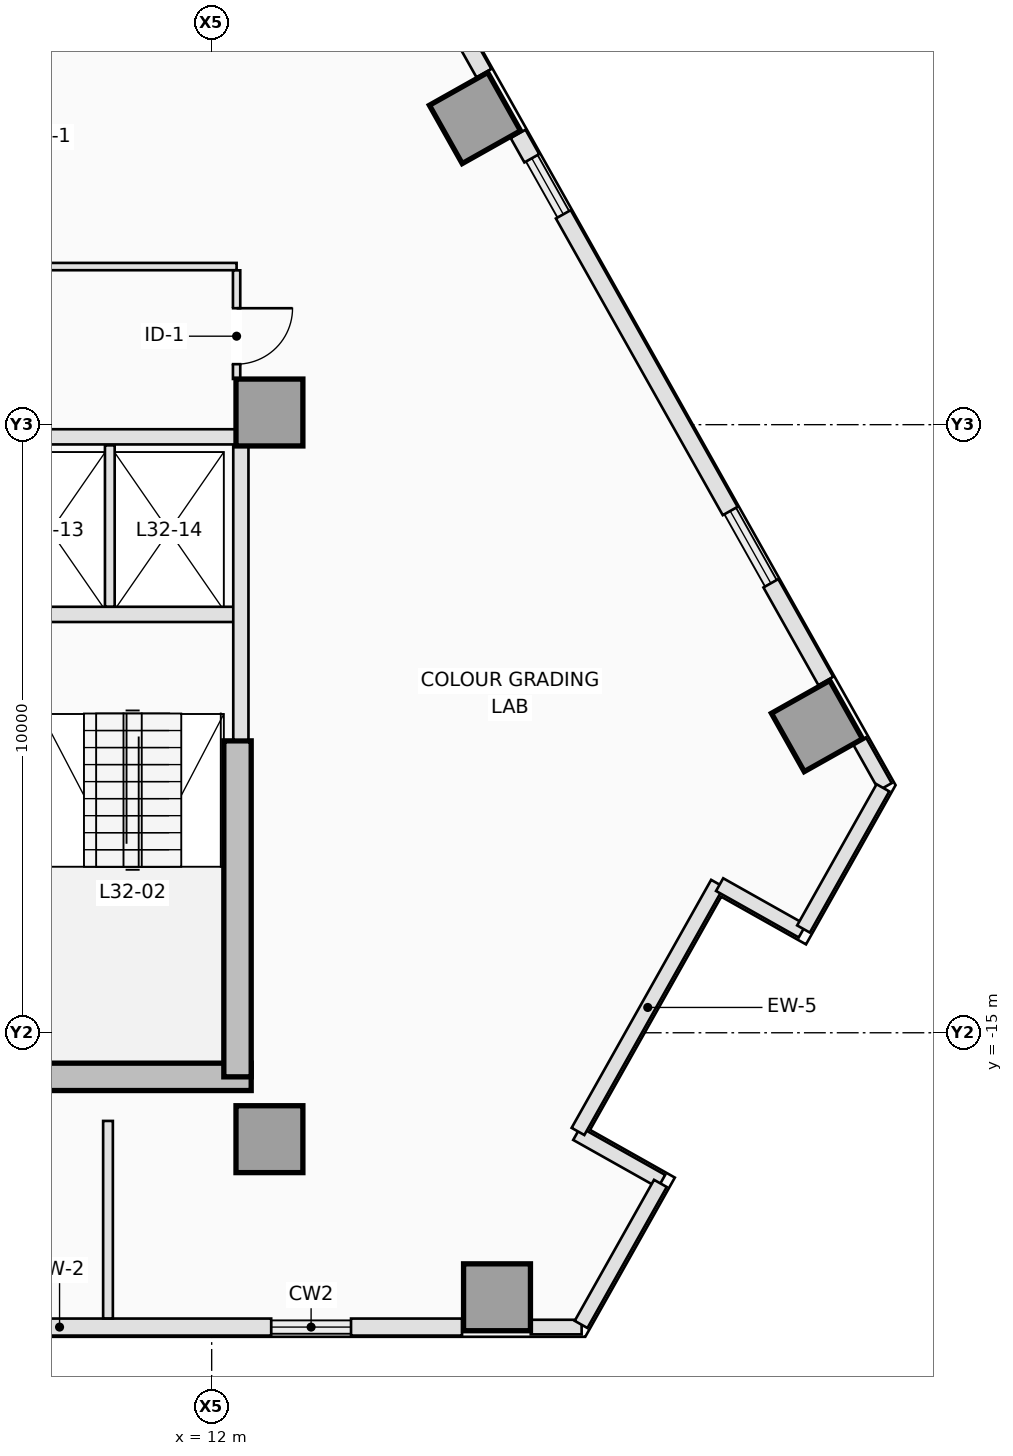
"""IFC4 building model, lengths in metres.
Left out: names, types, materials, properties, quantities, classifications, styles, units other than length and angle.
Written with IfcOpenShell. Run it as: python <this file> out.ifc"""

import sys

from ifc_helpers import new_model, si_unit, direction, frame, frame_2d, origin, origin_2d, place, context, subcontext, project, spatial, rectangle, extrude, element, fill, save


model = new_model("IFC4")
c1 = context("Model", 3, precision=1e-05, world=origin(), true_north=direction((0.0, 1.0)))
c2 = subcontext(c1, "Body", "Model", "MODEL_VIEW")
j1 = project(units=[si_unit("LENGTHUNIT", "METRE"), si_unit("PLANEANGLEUNIT", "RADIAN")], contexts=[c1])
p1 = place(None, origin())
s1 = spatial("IfcSite", under=j1, at=p1, CompositionType="ELEMENT")
p2 = place(p1, origin())
s2 = spatial("IfcBuilding", under=s1, at=p2, CompositionType="ELEMENT")
p3 = place(p2, frame((0.0, 0.0, 119.5)))
s3 = spatial("IfcBuildingStorey", under=s2, at=p3, CompositionType="ELEMENT", Elevation=119.5)
p4 = place(p3, frame((8.75, -15.725, 0.0), z_axis=(0.0, 0.0, 1.0), x_axis=(1.0, 0.0, 0.0)))
e1 = element("IfcWall", 1, at=p4, inside=s3, PredefinedType="SHEAR", context=c2, shape_type="SweptSolid", body=[
    extrude(rectangle(XDim=3.9, YDim=0.45, at=frame_2d((1.95, 0.0))), origin(), (0.0, 0.0, 1.0), 3.5),
])
p5 = place(p3, frame((12.425, -15.725, 0.0), z_axis=(0.0, 0.0, 1.0), x_axis=(0.0, 1.0, 0.0)))
e2 = element("IfcWall", 2, at=p5, inside=s3, PredefinedType="SHEAR", context=c2, shape_type="SweptSolid", body=[
    extrude(rectangle(XDim=5.525, YDim=0.45, at=frame_2d((2.763, 0.0))), origin(), (0.0, 0.0, 1.0), 3.5),
])
for number, where, z_axis, x_axis in (
    (3, (12.95, -16.75, 0.0), (0.0, 0.0, 1.0), (1.0, 0.0, 0.0)),
    (4, (12.95, -4.8, 0.0), (0.0, 0.0, 1.0), (1.0, 0.0, 0.0)),
    (5, (16.692, -19.35, 0.0), (0.0, 0.0, 1.0), (0.0, 1.0, 0.0)),
    (6, (21.955, -9.957, 0.0), (0.0, 0.0, 1.0), (0.872, 0.49, 0.0)),
    (7, (16.33, 0.043, 0.0), (0.0, 0.0, 1.0), (0.872, 0.49, 0.0)),
):
    element("IfcColumn", number, at=place(p3, frame(where, z_axis=z_axis, x_axis=x_axis)), inside=s3, PredefinedType="COLUMN", context=c2, shape_type="SweptSolid", body=[
        extrude(rectangle(XDim=1.1, YDim=1.1, at=origin_2d()), origin(), (0.0, 0.0, 1.0), 3.5),
    ])
p6 = place(p3, frame((18.084, -19.84, 0.0), z_axis=(0.0, 0.0, 1.0), x_axis=(-1.0, 0.0, 0.0)))
e8 = element("IfcWall", 8, at=p6, inside=s3, PredefinedType="STANDARD", context=c2, shape_type="SweptSolid", body=[
    extrude(rectangle(XDim=0.836, YDim=0.24, at=frame_2d((0.418, 0.0))), origin(), (0.0, 0.0, 1.0), 3.25),
])
p7 = place(p3, frame((16.117, -19.84, 0.0), z_axis=(0.0, 0.0, 1.0), x_axis=(-1.0, 0.0, 0.0)))
e9 = element("IfcWall", 9, at=p7, inside=s3, PredefinedType="STANDARD", context=c2, shape_type="SweptSolid", body=[
    extrude(rectangle(XDim=1.826, YDim=0.28, at=frame_2d((0.913, 0.0))), origin(), (0.0, 0.0, 1.0), 3.25),
])
p8 = place(p3, frame((12.979, -19.84, 0.0), z_axis=(0.0, 0.0, 1.0), x_axis=(-1.0, 0.0, 0.0)))
e10 = element("IfcWall", 10, at=p8, inside=s3, PredefinedType="STANDARD", context=c2, shape_type="SweptSolid", body=[
    extrude(rectangle(XDim=6.96, YDim=0.28, at=frame_2d((3.48, 0.0))), origin(), (0.0, 0.0, 1.0), 3.25),
])
p9 = place(p3, frame((22.654, -10.2, 0.0), z_axis=(0.0, 0.0, 1.0), x_axis=(0.490355003566, -0.871522788272, 0.0)))
e11 = element("IfcWall", 11, at=p9, inside=s3, PredefinedType="STANDARD", context=c2, shape_type="SweptSolid", body=[
    extrude(rectangle(XDim=0.865, YDim=0.24, at=frame_2d((0.433, 0.0))), origin(), (0.0, 0.0, 1.0), 3.25),
])
p10 = place(p3, frame((17.039, -0.218, 0.0), z_axis=(0.0, 0.0, 1.0), x_axis=(0.490009165718, -0.871717280724, 0.0)))
e12 = element("IfcWall", 12, at=p10, inside=s3, PredefinedType="STANDARD", context=c2, shape_type="SweptSolid", body=[
    extrude(rectangle(XDim=0.46, YDim=0.28, at=frame_2d((0.23, 0.0))), origin(), (0.0, 0.0, 1.0), 3.25),
])
p11 = place(p3, frame((17.783, -1.541, 0.0), z_axis=(0.0, 0.0, 1.0), x_axis=(0.490265381388, -0.871573207374, 0.0)))
e13 = element("IfcWall", 13, at=p11, inside=s3, PredefinedType="STANDARD", context=c2, shape_type="SweptSolid", body=[
    extrude(rectangle(XDim=5.597, YDim=0.28, at=frame_2d((2.799, 0.0))), origin(), (0.0, 0.0, 1.0), 3.25),
])
p12 = place(p3, frame((21.196, -7.608, 0.0), z_axis=(0.0, 0.0, 1.0), x_axis=(0.490280102884, -0.871564926277, 0.0)))
e14 = element("IfcWall", 14, at=p12, inside=s3, PredefinedType="STANDARD", context=c2, shape_type="SweptSolid", body=[
    extrude(rectangle(XDim=1.844, YDim=0.28, at=frame_2d((0.922, 0.0))), origin(), (0.0, 0.0, 1.0), 3.25),
])
p13 = place(p3, frame((14.37, 4.527, 0.0), z_axis=(0.0, 0.0, 1.0), x_axis=(0.490293592365, -0.871557337922, 0.0)))
e15 = element("IfcWall", 15, at=p13, inside=s3, PredefinedType="STANDARD", context=c2, shape_type="SweptSolid", body=[
    extrude(rectangle(XDim=4.299, YDim=0.28, at=frame_2d((2.15, 0.0))), origin(), (0.0, 0.0, 1.0), 3.25),
])
p14 = place(p3, frame((19.399, -17.442, 0.0), z_axis=(0.0, 0.0, 1.0), x_axis=(-0.871575537125, 0.490261239633, 0.0)))
e16 = element("IfcWall", 16, at=p14, inside=s3, PredefinedType="STANDARD", context=c2, shape_type="SweptSolid", body=[
    extrude(rectangle(XDim=1.6, YDim=0.24, at=frame_2d((0.8, 0.0))), origin(), (0.0, 0.0, 1.0), 3.25),
])
p15 = place(p3, frame((18.024, -16.623, 0.0), z_axis=(0.0, 0.0, 1.0), x_axis=(0.490273623647, 0.871568571001, 0.0)))
e17 = element("IfcWall", 17, at=p15, inside=s3, PredefinedType="STANDARD", context=c2, shape_type="SweptSolid", body=[
    extrude(rectangle(XDim=4.68, YDim=0.24, at=frame_2d((2.34, 0.0))), origin(), (0.0, 0.0, 1.0), 2.722),
])
p16 = place(p3, frame((20.354, -12.564, 0.0), z_axis=(0.0, 0.0, 1.0), x_axis=(0.871546278971, -0.490313250496, 0.0)))
e18 = element("IfcWall", 18, at=p16, inside=s3, PredefinedType="STANDARD", context=c2, shape_type="SweptSolid", body=[
    extrude(rectangle(XDim=1.56, YDim=0.24, at=frame_2d((0.78, 0.0))), origin(), (0.0, 0.0, 1.0), 3.25),
])
p17 = place(p3, frame((21.733, -13.294, 0.0), z_axis=(0.0, 0.0, 1.0), x_axis=(0.490265590412, 0.871573089797, 0.0)))
e19 = element("IfcWall", 19, at=p17, inside=s3, PredefinedType="STANDARD", context=c2, shape_type="SweptSolid", body=[
    extrude(rectangle(XDim=2.664, YDim=0.24, at=frame_2d((1.332, 0.0))), origin(), (0.0, 0.0, 1.0), 3.25),
])
p18 = place(p3, frame((18.075, -19.796, 0.0), z_axis=(0.0, 0.0, 1.0), x_axis=(0.490248170584, 0.871582888335, 0.0)))
e20 = element("IfcWall", 20, at=p18, inside=s3, PredefinedType="STANDARD", context=c2, shape_type="SweptSolid", body=[
    extrude(rectangle(XDim=2.661, YDim=0.24, at=frame_2d((1.331, 0.0))), origin(), (0.0, 0.0, 1.0), 3.25),
])
p19 = place(p3, frame((9.16, -8.12, 0.0), z_axis=(0.0, 0.0, 1.0), x_axis=(1.0, 0.0, 0.0)))
e21 = element("IfcWall", 21, at=p19, inside=s3, PredefinedType="PARTITIONING", context=c2, shape_type="SweptSolid", body=[
    extrude(rectangle(XDim=3.22, YDim=0.25, at=frame_2d((1.61, 0.0))), origin(), (0.0, 0.0, 1.0), 3.25),
])
p20 = place(p3, frame((12.48, -10.18, 0.0), z_axis=(0.0, 0.0, 1.0), x_axis=(0.0, 1.0, 0.0)))
e22 = element("IfcWall", 22, at=p20, inside=s3, PredefinedType="PARTITIONING", context=c2, shape_type="SweptSolid", body=[
    extrude(rectangle(XDim=4.828, YDim=0.25, at=frame_2d((2.414, 0.0))), origin(), (0.0, 0.0, 1.0), 3.25),
])
p21 = place(p3, frame((4.302, -5.2, 0.0), z_axis=(0.0, 0.0, 1.0), x_axis=(1.0, 0.0, 0.0)))
e23 = element("IfcWall", 23, at=p21, inside=s3, PredefinedType="PARTITIONING", context=c2, shape_type="SweptSolid", body=[
    extrude(rectangle(XDim=8.096, YDim=0.25, at=frame_2d((4.048, 0.0))), origin(), (0.0, 0.0, 1.0), 3.25),
])
p22 = place(p3, frame((10.325, -7.993, 0.0), z_axis=(0.0, 0.0, 1.0), x_axis=(0.0, 1.0, 0.0)))
e24 = element("IfcWall", 24, at=p22, inside=s3, PredefinedType="PARTITIONING", context=c2, shape_type="SweptSolid", body=[
    extrude(rectangle(XDim=2.653, YDim=0.16, at=frame_2d((1.326, 0.0))), origin(), (0.0, 0.0, 1.0), 3.25),
])
p23 = place(p3, frame((8.382, -2.4, 0.0), z_axis=(0.0, 0.0, 1.0), x_axis=(1.0, 0.0, 0.0)))
e25 = element("IfcWall", 25, at=p23, inside=s3, PredefinedType="PARTITIONING", context=c2, shape_type="SweptSolid", body=[
    extrude(rectangle(XDim=4.028, YDim=0.12, at=frame_2d((2.014, 0.0))), origin(), (0.0, 0.0, 1.0), 3.25),
])
p24 = place(p3, frame((12.41, -2.462, 0.0), z_axis=(0.0, 0.0, 1.0), x_axis=(0.0, -1.0, 0.0)))
e26 = element("IfcWall", 26, at=p24, inside=s3, PredefinedType="PARTITIONING", context=c2, shape_type="SweptSolid", body=[
    extrude(rectangle(XDim=1.786, YDim=0.12, at=frame_2d((0.893, 0.0))), origin(), (0.0, 0.0, 1.0), 3.25),
])
p25 = place(p24, frame((0.623, 0.0, 0.0)))
e27 = element("IfcOpeningElement", 27, at=p25, cuts=e26, PredefinedType="OPENING", context=c2, shape_type="SweptSolid", body=[
    extrude(rectangle(XDim=0.92, YDim=2.12, at=frame_2d((0.46, 1.06))), frame((0.0, 0.07, 0.0), z_axis=(0.0, -1.0, 0.0), x_axis=(1.0, 0.0, 0.0)), (0.0, 0.0, 1.0), 0.14),
])
p26 = place(p3, frame((10.295, -19.698, 0.0), z_axis=(0.0, 0.0, 1.0), x_axis=(0.0, 1.0, 0.0)))
e28 = element("IfcWall", 28, at=p26, inside=s3, PredefinedType="PARTITIONING", context=c2, shape_type="SweptSolid", body=[
    extrude(rectangle(XDim=3.248, YDim=0.16, at=frame_2d((1.624, 0.0))), origin(), (0.0, 0.0, 1.0), 3.25),
])
p27 = place(p25, origin())
e29 = element("IfcDoor", 29, at=p27, inside=s3, OperationType="SINGLE_SWING_LEFT", PredefinedType="DOOR", context=c2, shape_type="SweptSolid", body=[
    extrude(rectangle(XDim=0.92, YDim=2.12, at=frame_2d((0.46, 1.06))), frame((0.0, 0.025, 0.0), z_axis=(0.0, -1.0, 0.0), x_axis=(1.0, 0.0, 0.0)), (0.0, 0.0, 1.0), 0.05),
])
fill(e27, e29)
save(model, sys.argv[1])
